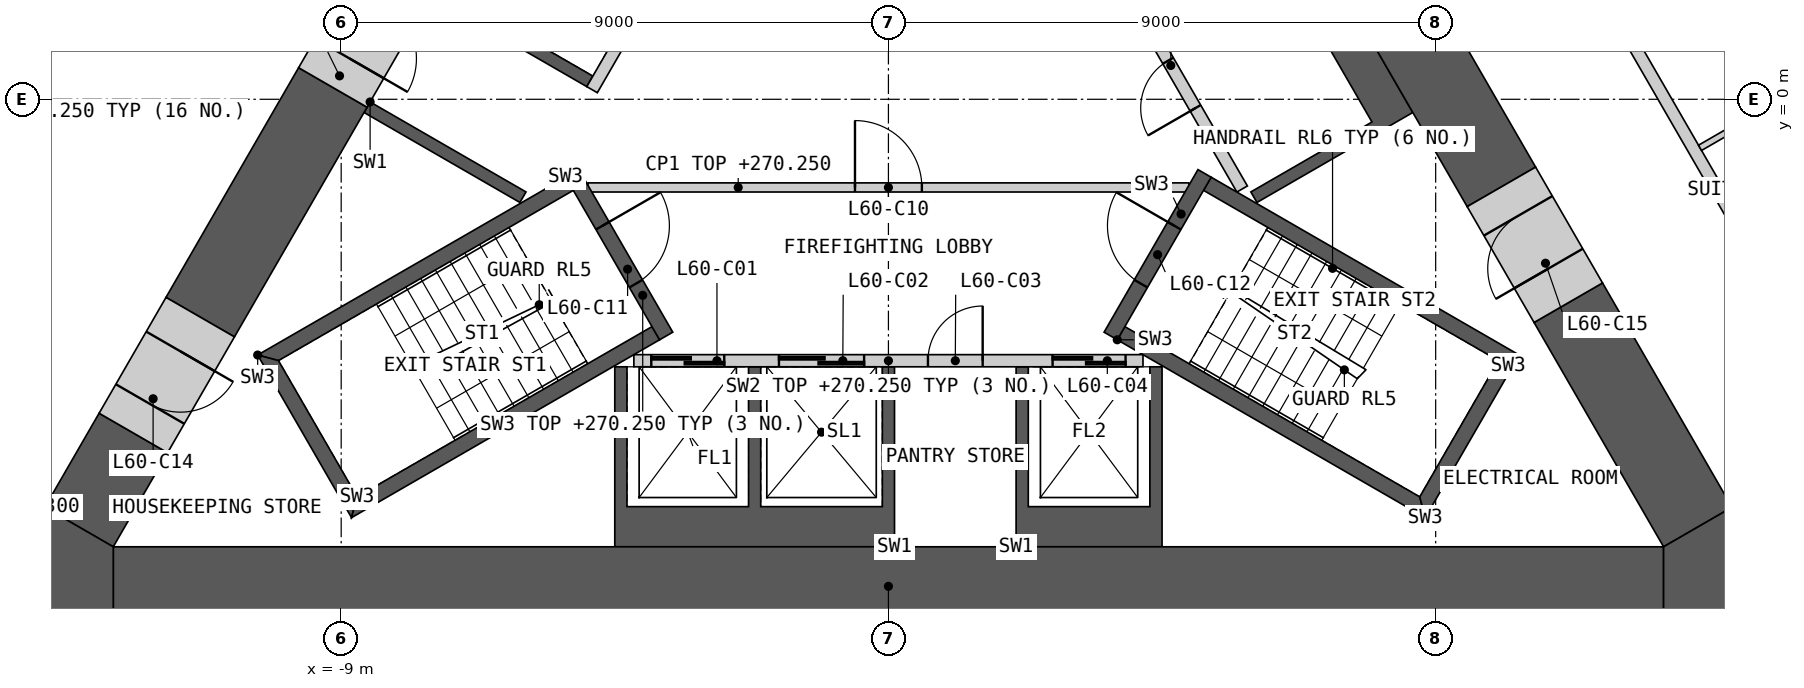
"""IFC4 building model, lengths in metres.
Left out: names, types, materials, properties, quantities, classifications, styles, units other than length and angle.
Written with IfcOpenShell. Run it as: python <this file> out.ifc"""

import sys

from ifc_helpers import new_model, si_unit, direction, frame, frame_2d, origin, place, context, subcontext, project, spatial, polyline, rectangle, outline, extrude, element, fill, save


model = new_model("IFC4")
c1 = context("Model", 3, precision=1e-05, world=origin(), true_north=direction((0.0, 1.0)))
c2 = subcontext(c1, "Body", "Model", "MODEL_VIEW")
j1 = project(units=[si_unit("LENGTHUNIT", "METRE"), si_unit("PLANEANGLEUNIT", "RADIAN")], contexts=[c1])
p1 = place(None, origin())
s1 = spatial("IfcSite", under=j1, at=p1, CompositionType="ELEMENT")
p2 = place(p1, origin())
s2 = spatial("IfcBuilding", under=s1, at=p2, CompositionType="ELEMENT")
p3 = place(p2, frame((0.0, 0.0, 267.0)))
s3 = spatial("IfcBuildingStorey", under=s2, at=p3, CompositionType="ELEMENT", Elevation=267.0)
p4 = place(p3, origin())
e1 = element("IfcWall", 1, at=p4, inside=s3, PredefinedType="SHEAR", context=c2, shape_type="SweptSolid", body=[
    extrude(outline(polyline([(0.1, -7.36), (-4.5, -7.36), (-4.5, -4.4), (-4.3, -4.4), (-4.3, -6.7), (-2.3, -6.7), (-2.3, -4.4), (-2.1, -4.4), (-2.1, -6.7), (-0.1, -6.7), (-0.1, -4.4), (0.1, -4.4), (0.1, -7.36)])), origin(), (0.0, 0.0, 1.0), 3.25),
])
p5 = place(p3, origin())
e2 = element("IfcWall", 2, at=p5, inside=s3, PredefinedType="SHEAR", context=c2, shape_type="SweptSolid", body=[
    extrude(outline(polyline([(2.1, -7.36), (2.1, -4.4), (2.3, -4.4), (2.3, -6.7), (4.3, -6.7), (4.3, -4.4), (4.5, -4.4), (4.5, -7.36), (2.1, -7.36)])), origin(), (0.0, 0.0, 1.0), 3.25),
])
p6 = place(p3, frame((-4.187, -4.3, 0.0), z_axis=(0.0, 0.0, 1.0), x_axis=(1.0, 0.0, 0.0)))
e3 = element("IfcWall", 3, at=p6, inside=s3, PredefinedType="SOLIDWALL", context=c2, shape_type="SweptSolid", body=[
    extrude(rectangle(XDim=8.373, YDim=0.2, at=frame_2d((4.187, 0.0))), origin(), (0.0, 0.0, 1.0), 3.25),
])
p7 = place(p6, frame((0.287, 0.0, 0.0)))
e4 = element("IfcOpeningElement", 4, at=p7, cuts=e3, PredefinedType="OPENING", context=c2, shape_type="SweptSolid", body=[
    extrude(rectangle(XDim=1.2, YDim=2.1, at=frame_2d((0.6, 1.05))), frame((0.0, 0.11, 0.0), z_axis=(0.0, -1.0, 0.0), x_axis=(1.0, 0.0, 0.0)), (0.0, 0.0, 1.0), 0.22),
])
p8 = place(p6, frame((2.387, 0.0, 0.0)))
e5 = element("IfcOpeningElement", 5, at=p8, cuts=e3, PredefinedType="OPENING", context=c2, shape_type="SweptSolid", body=[
    extrude(rectangle(XDim=1.4, YDim=2.1, at=frame_2d((0.7, 1.05))), frame((0.0, 0.11, 0.0), z_axis=(0.0, -1.0, 0.0), x_axis=(1.0, 0.0, 0.0)), (0.0, 0.0, 1.0), 0.22),
])
p9 = place(p6, frame((4.837, 0.0, 0.0)))
e6 = element("IfcOpeningElement", 6, at=p9, cuts=e3, PredefinedType="OPENING", context=c2, shape_type="SweptSolid", body=[
    extrude(rectangle(XDim=0.9, YDim=2.1, at=frame_2d((0.45, 1.05))), frame((0.0, 0.11, 0.0), z_axis=(0.0, -1.0, 0.0), x_axis=(1.0, 0.0, 0.0)), (0.0, 0.0, 1.0), 0.22),
])
p10 = place(p6, frame((6.887, 0.0, 0.0)))
e7 = element("IfcOpeningElement", 7, at=p10, cuts=e3, PredefinedType="OPENING", context=c2, shape_type="SweptSolid", body=[
    extrude(rectangle(XDim=1.2, YDim=2.1, at=frame_2d((0.6, 1.05))), frame((0.0, 0.11, 0.0), z_axis=(0.0, -1.0, 0.0), x_axis=(1.0, 0.0, 0.0)), (0.0, 0.0, 1.0), 0.22),
])
p11 = place(p3, origin())
e8 = element("IfcWall", 8, at=p11, inside=s3, PredefinedType="SHEAR", context=c2, shape_type="SweptSolid", body=[
    extrude(outline(polyline([(6.324, 3.767), (8.624, -0.217), (8.231, -0.444), (6.061, -1.697), (5.96, -1.524), (7.952, -0.374), (5.852, 3.263), (3.861, 2.113), (3.76, 2.287), (5.931, 3.54), (6.324, 3.767)])), origin(), (0.0, 0.0, 1.0), 3.25),
])
p12 = place(p3, frame((5.817, -1.476, 0.0), z_axis=(0.0, 0.0, 1.0), x_axis=(-0.500002616675, 0.866023893041, 0.0)))
e9 = element("IfcWall", 9, at=p12, inside=s3, PredefinedType="SOLIDWALL", context=c2, shape_type="SweptSolid", body=[
    extrude(rectangle(XDim=8.373, YDim=0.2, at=frame_2d((4.187, 0.0))), origin(), (0.0, 0.0, 1.0), 3.25),
])
p13 = place(p12, frame((1.537, 0.0, 0.0)))
e10 = element("IfcOpeningElement", 10, at=p13, cuts=e9, PredefinedType="OPENING", context=c2, shape_type="SweptSolid", body=[
    extrude(rectangle(XDim=0.9, YDim=2.1, at=frame_2d((0.45, 1.05))), frame((0.0, 0.11, 0.0), z_axis=(0.0, -1.0, 0.0), x_axis=(1.0, 0.0, 0.0)), (0.0, 0.0, 1.0), 0.22),
])
p14 = place(p12, frame((4.837, 0.0, 0.0)))
e11 = element("IfcOpeningElement", 11, at=p14, cuts=e9, PredefinedType="OPENING", context=c2, shape_type="SweptSolid", body=[
    extrude(rectangle(XDim=0.9, YDim=2.1, at=frame_2d((0.45, 1.05))), frame((0.0, 0.11, 0.0), z_axis=(0.0, -1.0, 0.0), x_axis=(1.0, 0.0, 0.0)), (0.0, 0.0, 1.0), 0.22),
])
p15 = place(p12, frame((6.937, 0.0, 0.0)))
e12 = element("IfcOpeningElement", 12, at=p15, cuts=e9, PredefinedType="OPENING", context=c2, shape_type="SweptSolid", body=[
    extrude(rectangle(XDim=1.1, YDim=2.1, at=frame_2d((0.55, 1.05))), frame((0.0, 0.11, 0.0), z_axis=(0.0, -1.0, 0.0), x_axis=(1.0, 0.0, 0.0)), (0.0, 0.0, 1.0), 0.22),
])
p16 = place(p3, origin())
e13 = element("IfcWall", 13, at=p16, inside=s3, PredefinedType="SHEAR", context=c2, shape_type="SweptSolid", body=[
    extrude(outline(polyline([(-7.524, 1.688), (-4.124, 7.577), (-3.731, 7.35), (-1.561, 6.097), (-1.66, 5.924), (-3.652, 7.074), (-4.652, 5.342), (-2.66, 4.192), (-2.76, 4.019), (-4.752, 5.169), (-5.752, 3.437), (-3.76, 2.287), (-3.861, 2.113), (-5.852, 3.263), (-6.852, 1.531), (-4.861, 0.381), (-4.96, 0.208), (-7.131, 1.461), (-7.524, 1.688)])), origin(), (0.0, 0.0, 1.0), 3.25),
])
p17 = place(p3, origin())
e14 = element("IfcWall", 14, at=p17, inside=s3, PredefinedType="SHEAR", context=c2, shape_type="SweptSolid", body=[
    extrude(outline(polyline([(-8.524, -0.044), (-8.131, -0.271), (-5.96, -1.524), (-6.061, -1.697), (-8.231, -0.444), (-8.624, -0.217), (-8.524, -0.044)])), origin(), (0.0, 0.0, 1.0), 3.25),
])
p18 = place(p3, frame((-1.631, 5.776, 0.0), z_axis=(0.0, 0.0, 1.0), x_axis=(-0.499992876559, -0.866029516466, 0.0)))
e15 = element("IfcWall", 15, at=p18, inside=s3, PredefinedType="SOLIDWALL", context=c2, shape_type="SweptSolid", body=[
    extrude(rectangle(XDim=6.486, YDim=0.2, at=frame_2d((3.243, 0.0))), origin(), (0.0, 0.0, 1.0), 3.25),
])
p19 = place(p18, frame((0.337, 0.0, 0.0)))
e16 = element("IfcOpeningElement", 16, at=p19, cuts=e15, PredefinedType="OPENING", context=c2, shape_type="SweptSolid", body=[
    extrude(rectangle(XDim=1.1, YDim=2.1, at=frame_2d((0.55, 1.05))), frame((0.0, 0.11, 0.0), z_axis=(0.0, -1.0, 0.0), x_axis=(1.0, 0.0, 0.0)), (0.0, 0.0, 1.0), 0.22),
])
p20 = place(p18, frame((2.537, 0.0, 0.0)))
e17 = element("IfcOpeningElement", 17, at=p20, cuts=e15, PredefinedType="OPENING", context=c2, shape_type="SweptSolid", body=[
    extrude(rectangle(XDim=1.1, YDim=2.1, at=frame_2d((0.55, 1.05))), frame((0.0, 0.11, 0.0), z_axis=(0.0, -1.0, 0.0), x_axis=(1.0, 0.0, 0.0)), (0.0, 0.0, 1.0), 0.22),
])
p21 = place(p3, frame((-4.941, -1.45, 0.0), z_axis=(0.0, 0.0, 1.0), x_axis=(1.0, 0.0, 0.0)))
e18 = element("IfcWall", 18, at=p21, inside=s3, PredefinedType="PARTITIONING", context=c2, shape_type="SweptSolid", body=[
    extrude(rectangle(XDim=9.882, YDim=0.15, at=frame_2d((4.941, 0.0))), origin(), (0.0, 0.0, 1.0), 3.25),
])
p22 = place(p21, frame((4.391, 0.0, 0.0)))
e19 = element("IfcOpeningElement", 19, at=p22, cuts=e18, PredefinedType="OPENING", context=c2, shape_type="SweptSolid", body=[
    extrude(rectangle(XDim=1.1, YDim=2.1, at=frame_2d((0.55, 1.05))), frame((0.0, 0.085, 0.0), z_axis=(0.0, -1.0, 0.0), x_axis=(1.0, 0.0, 0.0)), (0.0, 0.0, 1.0), 0.17),
])
p23 = place(p3, origin())
e20 = element("IfcWall", 20, at=p23, inside=s3, PredefinedType="SHEAR", context=c2, shape_type="SweptSolid", body=[
    extrude(outline(polyline([(-5.307, -1.281), (-10.374, -4.206), (-10.032, -4.298), (-5.182, -1.498), (-5.307, -1.281)])), origin(), (0.0, 0.0, 1.0), 3.25),
])
p24 = place(p3, origin())
e21 = element("IfcWall", 21, at=p24, inside=s3, PredefinedType="SHEAR", context=c2, shape_type="SweptSolid", body=[
    extrude(outline(polyline([(-10.374, -4.206), (-8.83, -6.881), (-8.738, -6.539), (-10.032, -4.298), (-10.374, -4.206)])), origin(), (0.0, 0.0, 1.0), 3.25),
])
p25 = place(p3, origin())
e22 = element("IfcWall", 22, at=p25, inside=s3, PredefinedType="SHEAR", context=c2, shape_type="SweptSolid", body=[
    extrude(outline(polyline([(-8.738, -6.539), (-8.83, -6.881), (-3.763, -3.956), (-3.888, -3.739), (-8.738, -6.539)])), origin(), (0.0, 0.0, 1.0), 3.25),
])
p26 = place(p3, frame((-5.199, -1.219, 0.0), z_axis=(0.0, 0.0, 1.0), x_axis=(0.499982516597, -0.866035497597, 0.0)))
e23 = element("IfcWall", 23, at=p26, inside=s3, PredefinedType="SHEAR", context=c2, shape_type="SweptSolid", body=[
    extrude(rectangle(XDim=3.088, YDim=0.25, at=frame_2d((1.544, 0.0))), origin(), (0.0, 0.0, 1.0), 3.25),
])
p27 = place(p26, frame((0.994, 0.0, 0.0)))
e24 = element("IfcOpeningElement", 24, at=p27, cuts=e23, PredefinedType="OPENING", context=c2, shape_type="SweptSolid", body=[
    extrude(rectangle(XDim=1.1, YDim=2.1, at=frame_2d((0.55, 1.05))), frame((0.0, 0.135, 0.0), z_axis=(0.0, -1.0, 0.0), x_axis=(1.0, 0.0, 0.0)), (0.0, 0.0, 1.0), 0.27),
])
p28 = place(p3, origin())
e25 = element("IfcWall", 25, at=p28, inside=s3, PredefinedType="SHEAR", context=c2, shape_type="SweptSolid", body=[
    extrude(outline(polyline([(3.763, -3.956), (8.83, -6.881), (8.738, -6.539), (3.888, -3.739), (3.763, -3.956)])), origin(), (0.0, 0.0, 1.0), 3.25),
])
p29 = place(p3, origin())
e26 = element("IfcWall", 26, at=p29, inside=s3, PredefinedType="SHEAR", context=c2, shape_type="SweptSolid", body=[
    extrude(outline(polyline([(8.83, -6.881), (10.374, -4.206), (10.032, -4.298), (8.738, -6.539), (8.83, -6.881)])), origin(), (0.0, 0.0, 1.0), 3.25),
])
p30 = place(p3, origin())
e27 = element("IfcWall", 27, at=p30, inside=s3, PredefinedType="SHEAR", context=c2, shape_type="SweptSolid", body=[
    extrude(outline(polyline([(10.032, -4.298), (10.374, -4.206), (5.307, -1.281), (5.182, -1.498), (10.032, -4.298)])), origin(), (0.0, 0.0, 1.0), 3.25),
])
p31 = place(p3, frame((3.655, -3.893, 0.0), z_axis=(0.0, 0.0, 1.0), x_axis=(0.499982516597, 0.866035497597, 0.0)))
e28 = element("IfcWall", 28, at=p31, inside=s3, PredefinedType="SHEAR", context=c2, shape_type="SweptSolid", body=[
    extrude(rectangle(XDim=3.088, YDim=0.25, at=frame_2d((1.544, 0.0))), origin(), (0.0, 0.0, 1.0), 3.25),
])
p32 = place(p31, frame((0.994, 0.0, 0.0)))
e29 = element("IfcOpeningElement", 29, at=p32, cuts=e28, PredefinedType="OPENING", context=c2, shape_type="SweptSolid", body=[
    extrude(rectangle(XDim=1.1, YDim=2.1, at=frame_2d((0.55, 1.05))), frame((0.0, 0.135, 0.0), z_axis=(0.0, -1.0, 0.0), x_axis=(1.0, 0.0, 0.0)), (0.0, 0.0, 1.0), 0.27),
])
p33 = place(p3, frame((-12.748, -8.01, 0.0), z_axis=(0.0, 0.0, 1.0), x_axis=(1.0, 0.0, 0.0)))
e30 = element("IfcWall", 30, at=p33, inside=s3, PredefinedType="SHEAR", context=c2, shape_type="SweptSolid", body=[
    extrude(rectangle(XDim=25.497, YDim=1.3, at=frame_2d((12.748, 0.0))), origin(), (0.0, 0.0, 1.0), 3.25),
])
p34 = place(p3, frame((10.081, -1.441, 0.0), z_axis=(0.0, 0.0, 1.0), x_axis=(-0.500012180433, 0.866018371294, 0.0)))
e31 = element("IfcWall", 31, at=p34, inside=s3, PredefinedType="SHEAR", context=c2, shape_type="SweptSolid", body=[
    extrude(rectangle(XDim=15.05, YDim=1.3, at=frame_2d((7.525, 0.0))), origin(), (0.0, 0.0, 1.0), 3.25),
])
p35 = place(p3, frame((13.311, -7.035, 0.0), z_axis=(0.0, 0.0, 1.0), x_axis=(-0.500003555838, 0.866023350811, 0.0)))
e32 = element("IfcWall", 32, at=p35, inside=s3, PredefinedType="SHEAR", context=c2, shape_type="SweptSolid", body=[
    extrude(rectangle(XDim=4.26, YDim=1.3, at=frame_2d((2.13, 0.0))), origin(), (0.0, 0.0, 1.0), 3.25),
])
p36 = place(p3, frame((-9.137, 0.195, 0.0), z_axis=(0.0, 0.0, 1.0), x_axis=(-0.499985697398, -0.866033661238, 0.0)))
e33 = element("IfcWall", 33, at=p36, inside=s3, PredefinedType="SHEAR", context=c2, shape_type="SweptSolid", body=[
    extrude(rectangle(XDim=4.362, YDim=1.3, at=frame_2d((2.181, 0.0))), origin(), (0.0, 0.0, 1.0), 3.25),
])
p37 = place(p3, frame((-12.418, -5.488, 0.0), z_axis=(0.0, 0.0, 1.0), x_axis=(-0.499931460552, -0.866064971437, 0.0)))
e34 = element("IfcWall", 34, at=p37, inside=s3, PredefinedType="SHEAR", context=c2, shape_type="SweptSolid", body=[
    extrude(rectangle(XDim=1.786, YDim=1.3, at=frame_2d((0.893, 0.0))), origin(), (0.0, 0.0, 1.0), 3.25),
])
p38 = place(p3, origin())
e35 = element("IfcWall", 35, at=p38, inside=s3, PredefinedType="SHEAR", context=c2, shape_type="SweptSolid", body=[
    extrude(outline(polyline([(12.748, -8.66), (12.748, -7.36), (13.874, -6.71), (15.0, -8.66), (12.748, -8.66)])), origin(), (0.0, 0.0, 1.0), 3.25),
])
p39 = place(p3, origin())
e36 = element("IfcWall", 36, at=p39, inside=s3, PredefinedType="SHEAR", context=c2, shape_type="SweptSolid", body=[
    extrude(outline(polyline([(-13.874, -6.71), (-12.748, -7.36), (-12.748, -8.66), (-15.0, -8.66), (-13.874, -6.71)])), origin(), (0.0, 0.0, 1.0), 3.25),
])
p40 = place(p3, frame((-11.318, -3.583, 0.0), z_axis=(0.0, 0.0, 1.0), x_axis=(-0.50002983664, -0.866008176907, 0.0)))
e37 = element("IfcWall", 37, at=p40, inside=s3, PredefinedType="SHEAR", context=c2, shape_type="SweptSolid", body=[
    extrude(rectangle(XDim=2.2, YDim=1.3, at=frame_2d((1.1, 0.0))), origin(), (0.0, 0.0, 1.0), 3.25),
])
p41 = place(p40, frame((0.65, 0.0, 0.0)))
e38 = element("IfcOpeningElement", 38, at=p41, cuts=e37, PredefinedType="OPENING", context=c2, shape_type="SweptSolid", body=[
    extrude(rectangle(XDim=1.0, YDim=2.1, at=frame_2d((0.5, 1.05))), frame((0.0, 0.66, 0.0), z_axis=(0.0, -1.0, 0.0), x_axis=(1.0, 0.0, 0.0)), (0.0, 0.0, 1.0), 1.32),
])
p42 = place(p3, frame((11.181, -3.346, 0.0), z_axis=(0.0, 0.0, 1.0), x_axis=(-0.499946605688, 0.86605622881, 0.0)))
e39 = element("IfcWall", 39, at=p42, inside=s3, PredefinedType="SHEAR", context=c2, shape_type="SweptSolid", body=[
    extrude(rectangle(XDim=2.2, YDim=1.3, at=frame_2d((1.1, 0.0))), origin(), (0.0, 0.0, 1.0), 3.25),
])
p43 = place(p42, frame((0.65, 0.0, 0.0)))
e40 = element("IfcOpeningElement", 40, at=p43, cuts=e39, PredefinedType="OPENING", context=c2, shape_type="SweptSolid", body=[
    extrude(rectangle(XDim=1.0, YDim=2.1, at=frame_2d((0.5, 1.05))), frame((0.0, 0.66, 0.0), z_axis=(0.0, -1.0, 0.0), x_axis=(1.0, 0.0, 0.0)), (0.0, 0.0, 1.0), 1.32),
])
p44 = place(p3, frame((-8.037, 2.1, 0.0), z_axis=(0.0, 0.0, 1.0), x_axis=(-0.50002983664, -0.866008176907, 0.0)))
e41 = element("IfcWall", 41, at=p44, inside=s3, PredefinedType="SHEAR", context=c2, shape_type="SweptSolid", body=[
    extrude(rectangle(XDim=2.2, YDim=1.3, at=frame_2d((1.1, 0.0))), origin(), (0.0, 0.0, 1.0), 3.25),
])
p45 = place(p44, frame((0.55, 0.0, 0.0)))
e42 = element("IfcOpeningElement", 42, at=p45, cuts=e41, PredefinedType="OPENING", context=c2, shape_type="SweptSolid", body=[
    extrude(rectangle(XDim=1.1, YDim=2.1, at=frame_2d((0.55, 1.05))), frame((0.0, 0.66, 0.0), z_axis=(0.0, -1.0, 0.0), x_axis=(1.0, 0.0, 0.0)), (0.0, 0.0, 1.0), 1.32),
])
p46 = place(p3, frame((-18.976, -4.747, 0.0), z_axis=(0.0, 0.0, 1.0), x_axis=(0.499999852422, 0.866025488988, 0.0)))
e43 = element("IfcWall", 43, at=p46, inside=s3, PredefinedType="PARTITIONING", context=c2, shape_type="SweptSolid", body=[
    extrude(rectangle(XDim=27.198, YDim=0.2, at=frame_2d((13.599, 0.0))), origin(), (0.0, 0.0, 1.0), 3.25),
])
p47 = place(p46, frame((19.886, 0.0, 0.0)))
e44 = element("IfcOpeningElement", 44, at=p47, cuts=e43, PredefinedType="OPENING", context=c2, shape_type="SweptSolid", body=[
    extrude(rectangle(XDim=0.95, YDim=2.1, at=frame_2d((0.475, 1.05))), frame((0.0, 0.11, 0.0), z_axis=(0.0, -1.0, 0.0), x_axis=(1.0, 0.0, 0.0)), (0.0, 0.0, 1.0), 0.22),
])
p48 = place(p46, frame((11.895, 0.0, 0.0)))
e45 = element("IfcOpeningElement", 45, at=p48, cuts=e43, PredefinedType="OPENING", context=c2, shape_type="SweptSolid", body=[
    extrude(rectangle(XDim=1.1, YDim=2.1, at=frame_2d((0.55, 1.05))), frame((0.0, 0.11, 0.0), z_axis=(0.0, -1.0, 0.0), x_axis=(1.0, 0.0, 0.0)), (0.0, 0.0, 1.0), 0.22),
])
p49 = place(p46, frame((1.152, 0.0, 0.0)))
e46 = element("IfcOpeningElement", 46, at=p49, cuts=e43, PredefinedType="OPENING", context=c2, shape_type="SweptSolid", body=[
    extrude(rectangle(XDim=0.95, YDim=2.1, at=frame_2d((0.475, 1.05))), frame((0.0, 0.11, 0.0), z_axis=(0.0, -1.0, 0.0), x_axis=(1.0, 0.0, 0.0)), (0.0, 0.0, 1.0), 0.22),
])
p50 = place(p3, frame((9.699, 5.321, 0.0), z_axis=(0.0, 0.0, 1.0), x_axis=(0.49998193945, -0.866035830797, 0.0)))
e47 = element("IfcWall", 47, at=p50, inside=s3, PredefinedType="PARTITIONING", context=c2, shape_type="SweptSolid", body=[
    extrude(rectangle(XDim=9.094, YDim=0.2, at=frame_2d((4.547, 0.0))), origin(), (0.0, 0.0, 1.0), 3.25),
])
p51 = place(p50, frame((1.162, 0.0, 0.0)))
e48 = element("IfcOpeningElement", 48, at=p51, cuts=e47, PredefinedType="OPENING", context=c2, shape_type="SweptSolid", body=[
    extrude(rectangle(XDim=1.1, YDim=2.1, at=frame_2d((0.55, 1.05))), frame((0.0, 0.11, 0.0), z_axis=(0.0, -1.0, 0.0), x_axis=(1.0, 0.0, 0.0)), (0.0, 0.0, 1.0), 0.22),
])
p52 = place(p3, frame((13.348, -0.799, 0.0), z_axis=(0.0, 0.0, 1.0), x_axis=(0.866014668023, 0.500018594424, 0.0)))
e49 = element("IfcWall", 49, at=p52, inside=s3, PredefinedType="PARTITIONING", context=c2, shape_type="SweptSolid", body=[
    extrude(rectangle(XDim=2.45, YDim=0.1, at=frame_2d((1.225, 0.0))), origin(), (0.0, 0.0, 1.0), 2.404),
])
p53 = place(p7, origin())
e50 = element("IfcDoor", 50, at=p53, inside=s3, OperationType="SLIDING_TO_LEFT", PredefinedType="DOOR", context=c2, shape_type="SweptSolid", body=[
    extrude(rectangle(XDim=1.2, YDim=2.1, at=frame_2d((0.6, 1.05))), frame((0.0, 0.025, 0.0), z_axis=(0.0, -1.0, 0.0), x_axis=(1.0, 0.0, 0.0)), (0.0, 0.0, 1.0), 0.05),
])
fill(e4, e50)
p54 = place(p8, origin())
e51 = element("IfcDoor", 51, at=p54, inside=s3, OperationType="SLIDING_TO_LEFT", PredefinedType="DOOR", context=c2, shape_type="SweptSolid", body=[
    extrude(rectangle(XDim=1.4, YDim=2.1, at=frame_2d((0.7, 1.05))), frame((0.0, 0.025, 0.0), z_axis=(0.0, -1.0, 0.0), x_axis=(1.0, 0.0, 0.0)), (0.0, 0.0, 1.0), 0.05),
])
fill(e5, e51)
p55 = place(p9, origin())
e52 = element("IfcDoor", 52, at=p55, inside=s3, OperationType="SINGLE_SWING_RIGHT", PredefinedType="DOOR", context=c2, shape_type="SweptSolid", body=[
    extrude(rectangle(XDim=0.9, YDim=2.1, at=frame_2d((0.45, 1.05))), frame((0.0, 0.025, 0.0), z_axis=(0.0, -1.0, 0.0), x_axis=(1.0, 0.0, 0.0)), (0.0, 0.0, 1.0), 0.05),
])
fill(e6, e52)
p56 = place(p10, origin())
e53 = element("IfcDoor", 53, at=p56, inside=s3, OperationType="SLIDING_TO_LEFT", PredefinedType="DOOR", context=c2, shape_type="SweptSolid", body=[
    extrude(rectangle(XDim=1.2, YDim=2.1, at=frame_2d((0.6, 1.05))), frame((0.0, 0.025, 0.0), z_axis=(0.0, -1.0, 0.0), x_axis=(1.0, 0.0, 0.0)), (0.0, 0.0, 1.0), 0.05),
])
fill(e7, e53)
p57 = place(p13, origin())
e54 = element("IfcDoor", 54, at=p57, inside=s3, OperationType="SINGLE_SWING_LEFT", PredefinedType="DOOR", context=c2, shape_type="SweptSolid", body=[
    extrude(rectangle(XDim=0.9, YDim=2.1, at=frame_2d((0.45, 1.05))), frame((0.0, 0.025, 0.0), z_axis=(0.0, -1.0, 0.0), x_axis=(1.0, 0.0, 0.0)), (0.0, 0.0, 1.0), 0.05),
])
fill(e10, e54)
p58 = place(p22, origin())
e55 = element("IfcDoor", 55, at=p58, inside=s3, OperationType="SINGLE_SWING_LEFT", PredefinedType="DOOR", context=c2, shape_type="SweptSolid", body=[
    extrude(rectangle(XDim=1.1, YDim=2.1, at=frame_2d((0.55, 1.05))), frame((0.0, 0.025, 0.0), z_axis=(0.0, -1.0, 0.0), x_axis=(1.0, 0.0, 0.0)), (0.0, 0.0, 1.0), 0.05),
])
fill(e19, e55)
p59 = place(p27, origin())
e56 = element("IfcDoor", 56, at=p59, inside=s3, OperationType="SINGLE_SWING_LEFT", PredefinedType="DOOR", context=c2, shape_type="SweptSolid", body=[
    extrude(rectangle(XDim=1.1, YDim=2.1, at=frame_2d((0.55, 1.05))), frame((0.0, 0.025, 0.0), z_axis=(0.0, -1.0, 0.0), x_axis=(1.0, 0.0, 0.0)), (0.0, 0.0, 1.0), 0.05),
])
fill(e24, e56)
p60 = place(p32, origin())
e57 = element("IfcDoor", 57, at=p60, inside=s3, OperationType="SINGLE_SWING_RIGHT", PredefinedType="DOOR", context=c2, shape_type="SweptSolid", body=[
    extrude(rectangle(XDim=1.1, YDim=2.1, at=frame_2d((0.55, 1.05))), frame((0.0, 0.025, 0.0), z_axis=(0.0, -1.0, 0.0), x_axis=(1.0, 0.0, 0.0)), (0.0, 0.0, 1.0), 0.05),
])
fill(e29, e57)
p61 = place(p41, origin())
e58 = element("IfcDoor", 58, at=p61, inside=s3, OperationType="SINGLE_SWING_LEFT", PredefinedType="DOOR", context=c2, shape_type="SweptSolid", body=[
    extrude(rectangle(XDim=1.0, YDim=2.1, at=frame_2d((0.5, 1.05))), frame((0.0, 0.405, 0.0), z_axis=(0.0, -1.0, 0.0), x_axis=(1.0, 0.0, 0.0)), (0.0, 0.0, 1.0), 0.05),
])
fill(e38, e58)
p62 = place(p43, origin())
e59 = element("IfcDoor", 59, at=p62, inside=s3, OperationType="SINGLE_SWING_LEFT", PredefinedType="DOOR", context=c2, shape_type="SweptSolid", body=[
    extrude(rectangle(XDim=1.0, YDim=2.1, at=frame_2d((0.5, 1.05))), frame((0.0, 0.405, 0.0), z_axis=(0.0, -1.0, 0.0), x_axis=(1.0, 0.0, 0.0)), (0.0, 0.0, 1.0), 0.05),
])
fill(e40, e59)
p63 = place(p45, origin())
e60 = element("IfcDoor", 60, at=p63, inside=s3, OperationType="SINGLE_SWING_RIGHT", PredefinedType="DOOR", context=c2, shape_type="SweptSolid", body=[
    extrude(rectangle(XDim=1.1, YDim=2.1, at=frame_2d((0.55, 1.05))), frame((0.0, 0.405, 0.0), z_axis=(0.0, -1.0, 0.0), x_axis=(1.0, 0.0, 0.0)), (0.0, 0.0, 1.0), 0.05),
])
fill(e42, e60)
save(model, sys.argv[1])
